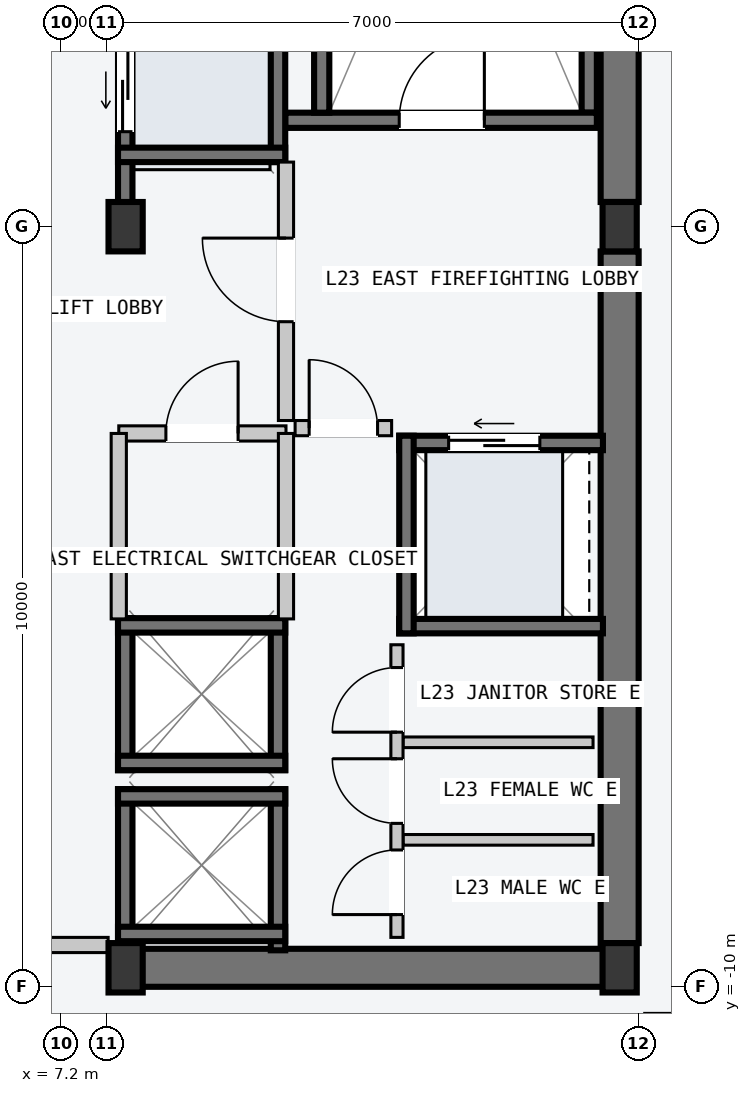
"""IFC4 building model, lengths in metres.
Left out: names, types, materials, properties, quantities, classifications, styles, units other than length and angle.
Written with IfcOpenShell. Run it as: python <this file> out.ifc"""

import sys

from ifc_helpers import new_model, si_unit, direction, frame, frame_2d, origin, origin_2d, place, context, subcontext, project, spatial, rectangle, i_section, extrude, element, fill, save


model = new_model("IFC4")
c1 = context("Model", 3, precision=1e-05, world=origin(), true_north=direction((0.0, 1.0)))
c2 = subcontext(c1, "Body", "Model", "MODEL_VIEW")
j1 = project(units=[si_unit("LENGTHUNIT", "METRE"), si_unit("PLANEANGLEUNIT", "RADIAN")], contexts=[c1])
p1 = place(None, origin())
s1 = spatial("IfcSite", under=j1, at=p1, CompositionType="ELEMENT")
p2 = place(p1, origin())
s2 = spatial("IfcBuilding", under=s1, at=p2, CompositionType="ELEMENT")
p3 = place(p2, frame((0.0, 0.0, 91.8)))
s3 = spatial("IfcBuildingStorey", under=s2, at=p3, CompositionType="ELEMENT", Elevation=91.8)
p4 = place(p3, frame((8.07, -9.75, -0.2), z_axis=(0.0, 0.0, 1.0), x_axis=(1.0, 0.0, 0.0)))
e1 = element("IfcWall", 1, at=p4, inside=s3, PredefinedType="SHEAR", context=c2, shape_type="SweptSolid", body=[
    extrude(rectangle(XDim=6.46, YDim=0.5, at=frame_2d((3.23, 0.0))), origin(), (0.0, 0.0, 1.0), 3.6),
])
for number, where, z_axis, x_axis in (
    (2, (14.55, -9.425, -0.2), (0.0, 0.0, 1.0), (0.0, 1.0, 0.0)),
    (3, (14.55, 0.325, -0.2), (0.0, 0.0, 1.0), (0.0, 1.0, 0.0)),
):
    element("IfcWall", number, at=place(p3, frame(where, z_axis=z_axis, x_axis=x_axis)), inside=s3, PredefinedType="SHEAR", context=c2, shape_type="SweptSolid", body=[
        extrude(rectangle(XDim=9.1, YDim=0.5, at=frame_2d((4.55, 0.0))), origin(), (0.0, 0.0, 1.0), 3.6),
    ])
p5 = place(p3, frame((14.15, 1.5, -0.2), z_axis=(0.0, 0.0, 1.0), x_axis=(0.0, 1.0, 0.0)))
e4 = element("IfcWall", 4, at=p5, inside=s3, PredefinedType="SOLIDWALL", context=c2, shape_type="SweptSolid", body=[
    extrude(rectangle(XDim=7.8, YDim=0.2, at=frame_2d((3.9, 0.0))), origin(), (0.0, 0.0, 1.0), 3.6),
])
p6 = place(p3, frame((10.15, 1.4, -0.2), z_axis=(0.0, 0.0, 1.0), x_axis=(1.0, 0.0, 0.0)))
e5 = element("IfcWall", 5, at=p6, inside=s3, PredefinedType="SOLIDWALL", context=c2, shape_type="SweptSolid", body=[
    extrude(rectangle(XDim=4.1, YDim=0.2, at=frame_2d((2.05, 0.0))), origin(), (0.0, 0.0, 1.0), 3.6),
])
p7 = place(p6, frame((1.5, 0.0, 0.2)))
e6 = element("IfcOpeningElement", 6, at=p7, cuts=e5, PredefinedType="OPENING", context=c2, shape_type="SweptSolid", body=[
    extrude(rectangle(XDim=1.12, YDim=2.18, at=frame_2d((0.56, 1.09))), frame((0.0, 0.11, 0.0), z_axis=(0.0, -1.0, 0.0), x_axis=(1.0, 0.0, 0.0)), (0.0, 0.0, 1.0), 0.22),
])
p8 = place(p3, frame((10.63, 1.5, -0.2), z_axis=(0.0, 0.0, 1.0), x_axis=(0.0, 1.0, 0.0)))
e7 = element("IfcWall", 7, at=p8, inside=s3, PredefinedType="SOLIDWALL", context=c2, shape_type="SweptSolid", body=[
    extrude(rectangle(XDim=7.8, YDim=0.2, at=frame_2d((3.9, 0.0))), origin(), (0.0, 0.0, 1.0), 3.6),
])
for number, where, z_axis, x_axis in (
    (8, (8.05, -9.75, 0.0), (0.0, 0.0, 1.0), (1.0, 0.0, 0.0)),
    (9, (8.05, 0.0, 0.0), (0.0, 0.0, 1.0), (1.0, 0.0, 0.0)),
    (10, (14.55, -9.75, 0.0), (0.0, 0.0, 1.0), (1.0, 0.0, 0.0)),
    (11, (14.55, 0.0, 0.0), (0.0, 0.0, 1.0), (1.0, 0.0, 0.0)),
):
    element("IfcColumn", number, at=place(p3, frame(where, z_axis=z_axis, x_axis=x_axis)), inside=s3, PredefinedType="COLUMN", context=c2, shape_type="SweptSolid", body=[
        extrude(i_section(OverallWidth=0.45, OverallDepth=0.65, WebThickness=0.025, FlangeThickness=0.04, at=origin_2d()), origin(), (0.0, 0.0, 1.0), 3.6),
    ])
p9 = place(p3, frame((8.045, 0.21, -0.2), z_axis=(0.0, 0.0, 1.0), x_axis=(0.0, 1.0, 0.0)))
e12 = element("IfcWall", 12, at=p9, inside=s3, PredefinedType="SOLIDWALL", context=c2, shape_type="SweptSolid", body=[
    extrude(rectangle(XDim=2.54, YDim=0.19, at=frame_2d((1.27, 0.0))), origin(), (0.0, 0.0, 1.0), 3.6),
])
p10 = place(p9, frame((1.04, 0.0, 0.2)))
e13 = element("IfcOpeningElement", 13, at=p10, cuts=e12, PredefinedType="OPENING", context=c2, shape_type="SweptSolid", body=[
    extrude(rectangle(XDim=1.1, YDim=2.2, at=frame_2d((0.55, 1.1))), frame((0.0, 0.105, 0.0), z_axis=(0.0, -1.0, 0.0), x_axis=(1.0, 0.0, 0.0)), (0.0, 0.0, 1.0), 0.21),
])
p11 = place(p3, frame((10.055, 0.85, -0.2), z_axis=(0.0, 0.0, 1.0), x_axis=(0.0, 1.0, 0.0)))
e14 = element("IfcWall", 14, at=p11, inside=s3, PredefinedType="SOLIDWALL", context=c2, shape_type="SweptSolid", body=[
    extrude(rectangle(XDim=1.9, YDim=0.19, at=frame_2d((0.95, 0.0))), origin(), (0.0, 0.0, 1.0), 3.6),
])
p12 = place(p3, frame((7.95, 0.945, -0.2), z_axis=(0.0, 0.0, 1.0), x_axis=(1.0, 0.0, 0.0)))
e15 = element("IfcWall", 15, at=p12, inside=s3, PredefinedType="SOLIDWALL", context=c2, shape_type="SweptSolid", body=[
    extrude(rectangle(XDim=2.2, YDim=0.19, at=frame_2d((1.1, 0.0))), origin(), (0.0, 0.0, 1.0), 3.6),
])
for number, where, z_axis, x_axis in (
    (16, (8.045, -9.52, -0.2), (0.0, 0.0, 1.0), (0.0, 1.0, 0.0)),
    (17, (10.055, -9.52, -0.2), (0.0, 0.0, 1.0), (0.0, 1.0, 0.0)),
):
    element("IfcWall", number, at=place(p3, frame(where, z_axis=z_axis, x_axis=x_axis)), inside=s3, PredefinedType="SOLIDWALL", context=c2, shape_type="SweptSolid", body=[
        extrude(rectangle(XDim=2.12, YDim=0.19, at=frame_2d((1.06, 0.0))), origin(), (0.0, 0.0, 1.0), 3.6),
    ])
for number, where, z_axis, x_axis in (
    (18, (7.95, -7.495, -0.2), (0.0, 0.0, 1.0), (1.0, 0.0, 0.0)),
    (19, (7.95, -9.305, -0.2), (0.0, 0.0, 1.0), (1.0, 0.0, 0.0)),
):
    element("IfcWall", number, at=place(p3, frame(where, z_axis=z_axis, x_axis=x_axis)), inside=s3, PredefinedType="SOLIDWALL", context=c2, shape_type="SweptSolid", body=[
        extrude(rectangle(XDim=2.2, YDim=0.19, at=frame_2d((1.1, 0.0))), origin(), (0.0, 0.0, 1.0), 3.6),
    ])
for number, where, z_axis, x_axis in (
    (20, (8.045, -7.15, -0.2), (0.0, 0.0, 1.0), (0.0, 1.0, 0.0)),
    (21, (10.055, -7.15, -0.2), (0.0, 0.0, 1.0), (0.0, 1.0, 0.0)),
):
    element("IfcWall", number, at=place(p3, frame(where, z_axis=z_axis, x_axis=x_axis)), inside=s3, PredefinedType="SOLIDWALL", context=c2, shape_type="SweptSolid", body=[
        extrude(rectangle(XDim=2.0, YDim=0.19, at=frame_2d((1.0, 0.0))), origin(), (0.0, 0.0, 1.0), 3.6),
    ])
for number, where, z_axis, x_axis in (
    (22, (7.95, -5.245, -0.2), (0.0, 0.0, 1.0), (1.0, 0.0, 0.0)),
    (23, (7.95, -7.055, -0.2), (0.0, 0.0, 1.0), (1.0, 0.0, 0.0)),
):
    element("IfcWall", number, at=place(p3, frame(where, z_axis=z_axis, x_axis=x_axis)), inside=s3, PredefinedType="SOLIDWALL", context=c2, shape_type="SweptSolid", body=[
        extrude(rectangle(XDim=2.2, YDim=0.19, at=frame_2d((1.1, 0.0))), origin(), (0.0, 0.0, 1.0), 3.6),
    ])
p13 = place(p3, frame((11.65, -2.845, -0.2), z_axis=(0.0, 0.0, 1.0), x_axis=(1.0, 0.0, 0.0)))
e24 = element("IfcWall", 24, at=p13, inside=s3, PredefinedType="SOLIDWALL", context=c2, shape_type="SweptSolid", body=[
    extrude(rectangle(XDim=2.68, YDim=0.19, at=frame_2d((1.34, 0.0))), origin(), (0.0, 0.0, 1.0), 3.6),
])
p14 = place(p13, frame((0.65, 0.0, 0.2)))
e25 = element("IfcOpeningElement", 25, at=p14, cuts=e24, PredefinedType="OPENING", context=c2, shape_type="SweptSolid", body=[
    extrude(rectangle(XDim=1.2, YDim=2.2, at=frame_2d((0.6, 1.1))), frame((0.0, 0.105, 0.0), z_axis=(0.0, -1.0, 0.0), x_axis=(1.0, 0.0, 0.0)), (0.0, 0.0, 1.0), 0.21),
])
p15 = place(p3, frame((11.65, -5.255, -0.2), z_axis=(0.0, 0.0, 1.0), x_axis=(1.0, 0.0, 0.0)))
e26 = element("IfcWall", 26, at=p15, inside=s3, PredefinedType="SOLIDWALL", context=c2, shape_type="SweptSolid", body=[
    extrude(rectangle(XDim=2.68, YDim=0.19, at=frame_2d((1.34, 0.0))), origin(), (0.0, 0.0, 1.0), 3.6),
])
p16 = place(p3, frame((11.745, -5.35, -0.2), z_axis=(0.0, 0.0, 1.0), x_axis=(0.0, 1.0, 0.0)))
e27 = element("IfcWall", 27, at=p16, inside=s3, PredefinedType="SOLIDWALL", context=c2, shape_type="SweptSolid", body=[
    extrude(rectangle(XDim=2.6, YDim=0.19, at=frame_2d((1.3, 0.0))), origin(), (0.0, 0.0, 1.0), 3.6),
])
p17 = place(p3, frame((6.02, -9.45, 0.0), z_axis=(0.0, 0.0, 1.0), x_axis=(1.0, 0.0, 0.0)))
e28 = element("IfcWall", 28, at=p17, inside=s3, PredefinedType="PARTITIONING", context=c2, shape_type="SweptSolid", body=[
    extrude(rectangle(XDim=1.8, YDim=0.2, at=frame_2d((0.9, 0.0))), origin(), (0.0, 0.0, 1.0), 3.4),
])
p18 = place(p3, frame((10.16, -2.55, 0.0), z_axis=(0.0, 0.0, 1.0), x_axis=(0.0, 1.0, 0.0)))
e29 = element("IfcWall", 29, at=p18, inside=s3, PredefinedType="PARTITIONING", context=c2, shape_type="SweptSolid", body=[
    extrude(rectangle(XDim=3.4, YDim=0.2, at=frame_2d((1.7, 0.0))), origin(), (0.0, 0.0, 1.0), 3.4),
])
p19 = place(p18, frame((1.3, 0.0, 0.0)))
e30 = element("IfcOpeningElement", 30, at=p19, cuts=e29, PredefinedType="OPENING", context=c2, shape_type="SweptSolid", body=[
    extrude(rectangle(XDim=1.1, YDim=2.15, at=frame_2d((0.55, 1.075))), frame((0.0, 0.11, 0.0), z_axis=(0.0, -1.0, 0.0), x_axis=(1.0, 0.0, 0.0)), (0.0, 0.0, 1.0), 0.22),
])
p20 = place(p3, frame((10.28, -2.65, 0.0), z_axis=(0.0, 0.0, 1.0), x_axis=(1.0, 0.0, 0.0)))
e31 = element("IfcWall", 31, at=p20, inside=s3, PredefinedType="PARTITIONING", context=c2, shape_type="SweptSolid", body=[
    extrude(rectangle(XDim=1.27, YDim=0.2, at=frame_2d((0.635, 0.0))), origin(), (0.0, 0.0, 1.0), 3.4),
])
p21 = place(p20, frame((0.185, 0.0, 0.0)))
e32 = element("IfcOpeningElement", 32, at=p21, cuts=e31, PredefinedType="OPENING", context=c2, shape_type="SweptSolid", body=[
    extrude(rectangle(XDim=0.9, YDim=2.15, at=frame_2d((0.45, 1.075))), frame((0.0, 0.11, 0.0), z_axis=(0.0, -1.0, 0.0), x_axis=(1.0, 0.0, 0.0)), (0.0, 0.0, 1.0), 0.22),
])
p22 = place(p3, frame((7.96, -2.72, 0.0), z_axis=(0.0, 0.0, 1.0), x_axis=(1.0, 0.0, 0.0)))
e33 = element("IfcWall", 33, at=p22, inside=s3, PredefinedType="PARTITIONING", context=c2, shape_type="SweptSolid", body=[
    extrude(rectangle(XDim=2.2, YDim=0.2, at=frame_2d((1.1, 0.0))), origin(), (0.0, 0.0, 1.0), 3.4),
])
p23 = place(p22, frame((0.62, 0.0, 0.0)))
e34 = element("IfcOpeningElement", 34, at=p23, cuts=e33, PredefinedType="OPENING", context=c2, shape_type="SweptSolid", body=[
    extrude(rectangle(XDim=0.95, YDim=2.1, at=frame_2d((0.475, 1.05))), frame((0.0, 0.11, 0.0), z_axis=(0.0, -1.0, 0.0), x_axis=(1.0, 0.0, 0.0)), (0.0, 0.0, 1.0), 0.22),
])
for number, where, z_axis, x_axis in (
    (35, (7.96, -5.16, 0.0), (0.0, 0.0, 1.0), (0.0, 1.0, 0.0)),
    (36, (10.16, -5.16, 0.0), (0.0, 0.0, 1.0), (0.0, 1.0, 0.0)),
):
    element("IfcWall", number, at=place(p3, frame(where, z_axis=z_axis, x_axis=x_axis)), inside=s3, PredefinedType="PARTITIONING", context=c2, shape_type="SweptSolid", body=[
        extrude(rectangle(XDim=2.44, YDim=0.2, at=frame_2d((1.22, 0.0))), origin(), (0.0, 0.0, 1.0), 3.4),
    ])
for number, where, z_axis, x_axis in (
    (37, (11.7, -8.067, 0.0), (0.0, 0.0, 1.0), (1.0, 0.0, 0.0)),
    (38, (11.7, -6.783, 0.0), (0.0, 0.0, 1.0), (1.0, 0.0, 0.0)),
):
    element("IfcWall", number, at=place(p3, frame(where, z_axis=z_axis, x_axis=x_axis)), inside=s3, PredefinedType="PARTITIONING", context=c2, shape_type="SweptSolid", body=[
        extrude(rectangle(XDim=2.5, YDim=0.14, at=frame_2d((1.25, 0.0))), origin(), (0.0, 0.0, 1.0), 3.4),
    ])
p24 = place(p3, frame((11.62, -9.35, 0.0), z_axis=(0.0, 0.0, 1.0), x_axis=(0.0, 1.0, 0.0)))
e39 = element("IfcWall", 39, at=p24, inside=s3, PredefinedType="PARTITIONING", context=c2, shape_type="SweptSolid", body=[
    extrude(rectangle(XDim=3.85, YDim=0.16, at=frame_2d((1.925, 0.0))), origin(), (0.0, 0.0, 1.0), 3.4),
])
p25 = place(p24, frame((0.3, 0.0, 0.0)))
e40 = element("IfcOpeningElement", 40, at=p25, cuts=e39, PredefinedType="OPENING", context=c2, shape_type="SweptSolid", body=[
    extrude(rectangle(XDim=0.85, YDim=2.12, at=frame_2d((0.425, 1.06))), frame((0.0, 0.09, 0.0), z_axis=(0.0, -1.0, 0.0), x_axis=(1.0, 0.0, 0.0)), (0.0, 0.0, 1.0), 0.18),
])
p26 = place(p24, frame((1.5, 0.0, 0.0)))
e41 = element("IfcOpeningElement", 41, at=p26, cuts=e39, PredefinedType="OPENING", context=c2, shape_type="SweptSolid", body=[
    extrude(rectangle(XDim=0.85, YDim=2.12, at=frame_2d((0.425, 1.06))), frame((0.0, 0.09, 0.0), z_axis=(0.0, -1.0, 0.0), x_axis=(1.0, 0.0, 0.0)), (0.0, 0.0, 1.0), 0.18),
])
p27 = place(p24, frame((2.7, 0.0, 0.0)))
e42 = element("IfcOpeningElement", 42, at=p27, cuts=e39, PredefinedType="OPENING", context=c2, shape_type="SweptSolid", body=[
    extrude(rectangle(XDim=0.85, YDim=2.12, at=frame_2d((0.425, 1.06))), frame((0.0, 0.09, 0.0), z_axis=(0.0, -1.0, 0.0), x_axis=(1.0, 0.0, 0.0)), (0.0, 0.0, 1.0), 0.18),
])
p28 = place(p3, frame((14.88, -10.4, 0.0), z_axis=(0.0, 0.0, 1.0), x_axis=(1.0, 0.0, 0.0)))
e43 = element("IfcWall", 43, at=p28, inside=s3, PredefinedType="PARTITIONING", context=c2, shape_type="SweptSolid", body=[
    extrude(rectangle(XDim=7.68, YDim=0.1, at=frame_2d((3.84, 0.0))), origin(), (0.0, 0.0, 1.0), 3.4),
])
p29 = place(p28, frame((3.36, 0.0, 0.0)))
e44 = element("IfcOpeningElement", 44, at=p29, cuts=e43, PredefinedType="OPENING", context=c2, shape_type="SweptSolid", body=[
    extrude(rectangle(XDim=0.96, YDim=2.18, at=frame_2d((0.48, 1.09))), frame((0.0, 0.06, 0.0), z_axis=(0.0, -1.0, 0.0), x_axis=(1.0, 0.0, 0.0)), (0.0, 0.0, 1.0), 0.12),
])
p30 = place(p7, origin())
e45 = element("IfcDoor", 45, at=p30, inside=s3, OperationType="SINGLE_SWING_RIGHT", PredefinedType="DOOR", context=c2, shape_type="SweptSolid", body=[
    extrude(rectangle(XDim=1.12, YDim=2.18, at=frame_2d((0.56, 1.09))), frame((0.0, 0.025, 0.0), z_axis=(0.0, -1.0, 0.0), x_axis=(1.0, 0.0, 0.0)), (0.0, 0.0, 1.0), 0.05),
])
fill(e6, e45)
p31 = place(p10, origin())
e46 = element("IfcDoor", 46, at=p31, inside=s3, OperationType="SLIDING_TO_LEFT", PredefinedType="DOOR", context=c2, shape_type="SweptSolid", body=[
    extrude(rectangle(XDim=1.1, YDim=2.2, at=frame_2d((0.55, 1.1))), frame((0.0, 0.025, 0.0), z_axis=(0.0, -1.0, 0.0), x_axis=(1.0, 0.0, 0.0)), (0.0, 0.0, 1.0), 0.05),
])
fill(e13, e46)
p32 = place(p14, origin())
e47 = element("IfcDoor", 47, at=p32, inside=s3, OperationType="SLIDING_TO_LEFT", PredefinedType="DOOR", context=c2, shape_type="SweptSolid", body=[
    extrude(rectangle(XDim=1.2, YDim=2.2, at=frame_2d((0.6, 1.1))), frame((0.0, 0.025, 0.0), z_axis=(0.0, -1.0, 0.0), x_axis=(1.0, 0.0, 0.0)), (0.0, 0.0, 1.0), 0.05),
])
fill(e25, e47)
p33 = place(p19, origin())
e48 = element("IfcDoor", 48, at=p33, inside=s3, OperationType="SINGLE_SWING_RIGHT", PredefinedType="DOOR", context=c2, shape_type="SweptSolid", body=[
    extrude(rectangle(XDim=1.1, YDim=2.15, at=frame_2d((0.55, 1.075))), frame((0.0, 0.025, 0.0), z_axis=(0.0, -1.0, 0.0), x_axis=(1.0, 0.0, 0.0)), (0.0, 0.0, 1.0), 0.05),
])
fill(e30, e48)
p34 = place(p21, origin())
e49 = element("IfcDoor", 49, at=p34, inside=s3, OperationType="SINGLE_SWING_LEFT", PredefinedType="DOOR", context=c2, shape_type="SweptSolid", body=[
    extrude(rectangle(XDim=0.9, YDim=2.15, at=frame_2d((0.45, 1.075))), frame((0.0, 0.025, 0.0), z_axis=(0.0, -1.0, 0.0), x_axis=(1.0, 0.0, 0.0)), (0.0, 0.0, 1.0), 0.05),
])
fill(e32, e49)
p35 = place(p23, origin())
e50 = element("IfcDoor", 50, at=p35, inside=s3, OperationType="SINGLE_SWING_RIGHT", PredefinedType="DOOR", context=c2, shape_type="SweptSolid", body=[
    extrude(rectangle(XDim=0.95, YDim=2.1, at=frame_2d((0.475, 1.05))), frame((0.0, 0.025, 0.0), z_axis=(0.0, -1.0, 0.0), x_axis=(1.0, 0.0, 0.0)), (0.0, 0.0, 1.0), 0.05),
])
fill(e34, e50)
p36 = place(p25, origin())
e51 = element("IfcDoor", 51, at=p36, inside=s3, OperationType="SINGLE_SWING_LEFT", PredefinedType="DOOR", context=c2, shape_type="SweptSolid", body=[
    extrude(rectangle(XDim=0.85, YDim=2.12, at=frame_2d((0.425, 1.06))), frame((0.0, 0.025, 0.0), z_axis=(0.0, -1.0, 0.0), x_axis=(1.0, 0.0, 0.0)), (0.0, 0.0, 1.0), 0.05),
])
fill(e40, e51)
p37 = place(p26, origin())
e52 = element("IfcDoor", 52, at=p37, inside=s3, OperationType="SINGLE_SWING_RIGHT", PredefinedType="DOOR", context=c2, shape_type="SweptSolid", body=[
    extrude(rectangle(XDim=0.85, YDim=2.12, at=frame_2d((0.425, 1.06))), frame((0.0, 0.025, 0.0), z_axis=(0.0, -1.0, 0.0), x_axis=(1.0, 0.0, 0.0)), (0.0, 0.0, 1.0), 0.05),
])
fill(e41, e52)
p38 = place(p27, origin())
e53 = element("IfcDoor", 53, at=p38, inside=s3, OperationType="SINGLE_SWING_LEFT", PredefinedType="DOOR", context=c2, shape_type="SweptSolid", body=[
    extrude(rectangle(XDim=0.85, YDim=2.12, at=frame_2d((0.425, 1.06))), frame((0.0, 0.025, 0.0), z_axis=(0.0, -1.0, 0.0), x_axis=(1.0, 0.0, 0.0)), (0.0, 0.0, 1.0), 0.05),
])
fill(e42, e53)
save(model, sys.argv[1])
